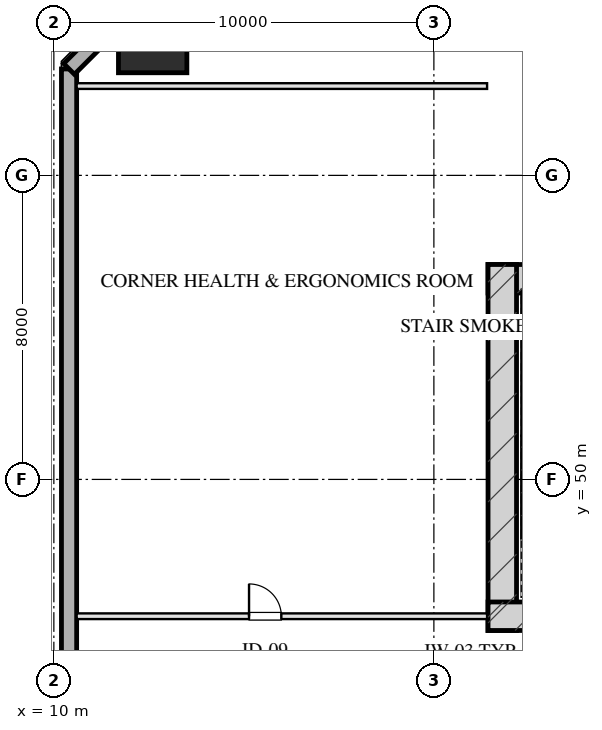
"""IFC4 building model, lengths in metres.
Left out: names, types, materials, properties, quantities, classifications, styles, units other than length and angle.
Written with IfcOpenShell. Run it as: python <this file> out.ifc"""

import sys

from ifc_helpers import new_model, si_unit, direction, frame, frame_2d, origin, origin_2d, place, context, subcontext, project, spatial, rectangle, hollow_rectangle, extrude, element, fill, save


model = new_model("IFC4")
c1 = context("Model", 3, precision=1e-05, world=origin(), true_north=direction((0.0, 1.0)))
c2 = subcontext(c1, "Body", "Model", "MODEL_VIEW")
j1 = project(units=[si_unit("LENGTHUNIT", "METRE"), si_unit("PLANEANGLEUNIT", "RADIAN")], contexts=[c1])
p1 = place(None, origin())
s1 = spatial("IfcSite", under=j1, at=p1, CompositionType="ELEMENT")
p2 = place(p1, origin())
s2 = spatial("IfcBuilding", under=s1, at=p2, CompositionType="ELEMENT")
p3 = place(p2, frame((0.0, 0.0, 85.1)))
s3 = spatial("IfcBuildingStorey", under=s2, at=p3, CompositionType="ELEMENT", Elevation=85.1)
p4 = place(p3, frame((21.425, 55.28, 0.0), z_axis=(0.0, 0.0, 1.0), x_axis=(1.0, 0.0, 0.0)))
e1 = element("IfcWall", 1, at=p4, inside=s3, PredefinedType="SHEAR", context=c2, shape_type="SweptSolid", body=[
    extrude(rectangle(XDim=17.15, YDim=0.75, at=frame_2d((8.575, 0.0))), origin(), (0.0, 0.0, 1.0), 3.45),
])
p5 = place(p3, frame((21.8, 46.025, 0.0), z_axis=(0.0, 0.0, 1.0), x_axis=(0.0, 1.0, 0.0)))
e2 = element("IfcWall", 2, at=p5, inside=s3, PredefinedType="SHEAR", context=c2, shape_type="SweptSolid", body=[
    extrude(rectangle(XDim=9.63, YDim=0.75, at=frame_2d((4.815, 0.0))), origin(), (0.0, 0.0, 1.0), 3.45),
])
p6 = place(p3, frame((21.425, 46.4, 0.0), z_axis=(0.0, 0.0, 1.0), x_axis=(1.0, 0.0, 0.0)))
e3 = element("IfcWall", 3, at=p6, inside=s3, PredefinedType="SHEAR", context=c2, shape_type="SweptSolid", body=[
    extrude(rectangle(XDim=4.295, YDim=0.75, at=frame_2d((2.147, 0.0))), origin(), (0.0, 0.0, 1.0), 3.45),
])
p7 = place(p3, frame((12.6, 61.6, 0.0), z_axis=(0.0, 0.0, 1.0), x_axis=(1.0, 0.0, 0.0)))
e4 = element("IfcColumn", 4, at=p7, inside=s3, PredefinedType="COLUMN", context=c2, shape_type="SweptSolid", body=[
    extrude(hollow_rectangle(XDim=1.8, YDim=1.8, WallThickness=0.06, at=origin_2d()), origin(), (0.0, 0.0, 1.0), 3.451),
])
p8 = place(p3, frame((10.4, 7.2, 0.0), z_axis=(0.0, 0.0, 1.0), x_axis=(0.0, 1.0, 0.0)))
e5 = element("IfcWall", 5, at=p8, inside=s3, PredefinedType="SOLIDWALL", context=c2, shape_type="SweptSolid", body=[
    extrude(rectangle(XDim=53.6, YDim=0.4, at=frame_2d((26.8, 0.0))), origin(), (0.0, 0.0, 1.0), 2.61),
])
p9 = place(p3, frame((10.4, 60.8, 0.0), z_axis=(0.0, 0.0, 1.0), x_axis=(0.707106781187, 0.707106781187, 0.0)))
e6 = element("IfcWall", 6, at=p9, inside=s3, PredefinedType="SOLIDWALL", context=c2, shape_type="SweptSolid", body=[
    extrude(rectangle(XDim=4.243, YDim=0.4, at=frame_2d((2.121, 0.0))), origin(), (0.0, 0.0, 1.0), 2.61),
])
p10 = place(p3, frame((10.6, 60.35, 0.0), z_axis=(0.0, 0.0, 1.0), x_axis=(1.0, 0.0, 0.0)))
e7 = element("IfcWall", 7, at=p10, inside=s3, PredefinedType="PARTITIONING", context=c2, shape_type="SweptSolid", body=[
    extrude(rectangle(XDim=10.8, YDim=0.15, at=frame_2d((5.4, 0.0))), origin(), (0.0, 0.0, 1.0), 3.175),
])
p11 = place(p3, frame((10.6, 46.4, 0.0), z_axis=(0.0, 0.0, 1.0), x_axis=(1.0, 0.0, 0.0)))
e8 = element("IfcWall", 8, at=p11, inside=s3, PredefinedType="PARTITIONING", context=c2, shape_type="SweptSolid", body=[
    extrude(rectangle(XDim=10.8, YDim=0.15, at=frame_2d((5.4, 0.0))), origin(), (0.0, 0.0, 1.0), 3.175),
])
p12 = place(p11, frame((4.536, 0.0, 0.0)))
e9 = element("IfcOpeningElement", 9, at=p12, cuts=e8, PredefinedType="OPENING", context=c2, shape_type="SweptSolid", body=[
    extrude(rectangle(XDim=0.85, YDim=2.05, at=frame_2d((0.425, 1.025))), frame((0.0, 0.085, 0.0), z_axis=(0.0, -1.0, 0.0), x_axis=(1.0, 0.0, 0.0)), (0.0, 0.0, 1.0), 0.17),
])
p13 = place(p12, origin())
e10 = element("IfcDoor", 10, at=p13, inside=s3, OperationType="SINGLE_SWING_LEFT", PredefinedType="DOOR", context=c2, shape_type="SweptSolid", body=[
    extrude(rectangle(XDim=0.85, YDim=2.05, at=frame_2d((0.425, 1.025))), frame((0.0, 0.025, 0.0), z_axis=(0.0, -1.0, 0.0), x_axis=(1.0, 0.0, 0.0)), (0.0, 0.0, 1.0), 0.05),
])
fill(e9, e10)
save(model, sys.argv[1])
